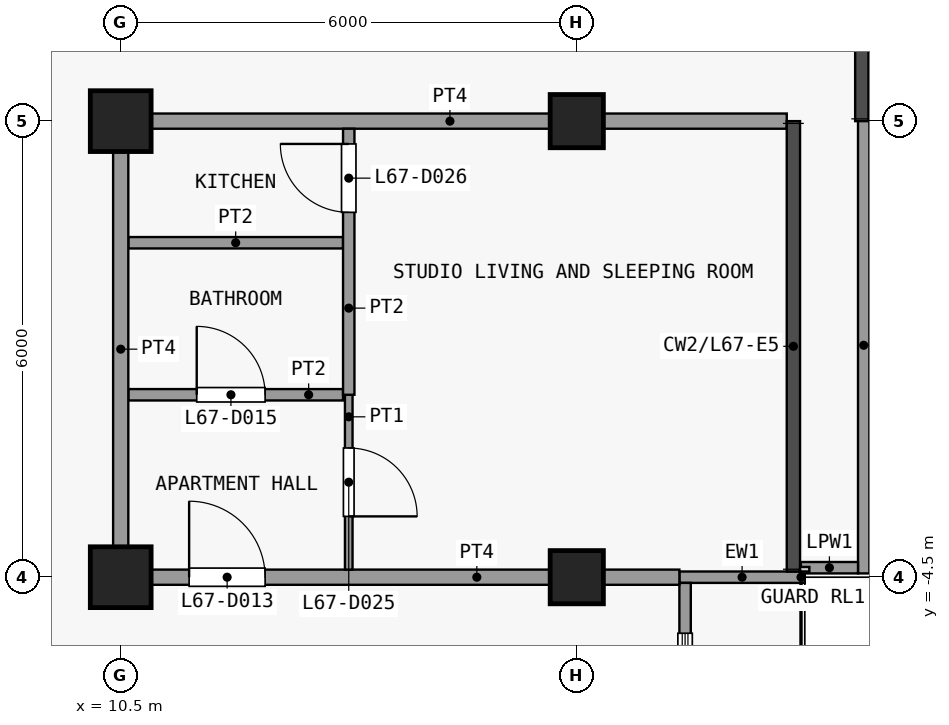
"""IFC4 building model, lengths in metres.
Left out: names, types, materials, properties, quantities, classifications, styles, units other than length and angle.
Written with IfcOpenShell. Run it as: python <this file> out.ifc"""

import sys

from ifc_helpers import new_model, si_unit, direction, frame, frame_2d, origin, origin_2d, place, context, subcontext, project, spatial, rectangle, extrude, element, fill, save


model = new_model("IFC4")
c1 = context("Model", 3, precision=1e-05, world=origin(), true_north=direction((0.0, 1.0)))
c2 = subcontext(c1, "Body", "Model", "MODEL_VIEW")
j1 = project(units=[si_unit("LENGTHUNIT", "METRE"), si_unit("PLANEANGLEUNIT", "RADIAN")], contexts=[c1])
p1 = place(None, origin())
s1 = spatial("IfcSite", under=j1, at=p1, CompositionType="ELEMENT")
p2 = place(p1, origin())
s2 = spatial("IfcBuilding", under=s1, at=p2, CompositionType="ELEMENT")
p3 = place(p2, frame((0.0, 0.0, 266.3)))
s3 = spatial("IfcBuildingStorey", under=s2, at=p3, CompositionType="ELEMENT", Elevation=266.3)
for number, where, z_axis, x_axis in (
    (1, (10.5, -4.5, 0.0), (0.0, 0.0, 1.0), (1.0, 0.0, 0.0)),
    (2, (10.5, 1.5, 0.0), (0.0, 0.0, 1.0), (1.0, 0.0, 0.0)),
):
    element("IfcColumn", number, at=place(p3, frame(where, z_axis=z_axis, x_axis=x_axis)), inside=s3, PredefinedType="COLUMN", context=c2, shape_type="SweptSolid", body=[
        extrude(rectangle(XDim=0.8, YDim=0.8, at=origin_2d()), origin(), (0.0, 0.0, 1.0), 3.6),
    ])
for number, where, z_axis, x_axis in (
    (3, (16.5, -4.5, 0.0), (0.0, 0.0, 1.0), (1.0, 0.0, 0.0)),
    (4, (16.5, 1.5, 0.0), (0.0, 0.0, 1.0), (1.0, 0.0, 0.0)),
):
    element("IfcColumn", number, at=place(p3, frame(where, z_axis=z_axis, x_axis=x_axis)), inside=s3, PredefinedType="COLUMN", context=c2, shape_type="SweptSolid", body=[
        extrude(rectangle(XDim=0.7, YDim=0.7, at=origin_2d()), origin(), (0.0, 0.0, 1.0), 3.6),
    ])
p4 = place(p3, frame((17.85, -4.5, 0.0), z_axis=(0.0, 0.0, 1.0), x_axis=(1.0, 0.0, 0.0)))
e5 = element("IfcWall", 5, at=p4, inside=s3, PredefinedType="SOLIDWALL", context=c2, shape_type="SweptSolid", body=[
    extrude(rectangle(XDim=1.65, YDim=0.15, at=frame_2d((0.825, 0.0))), origin(), (0.0, 0.0, 1.0), 3.3),
])
p5 = place(p3, frame((17.925, -4.575, 0.0), z_axis=(0.0, 0.0, 1.0), x_axis=(0.0, -1.0, 0.0)))
e6 = element("IfcWall", 6, at=p5, inside=s3, PredefinedType="SOLIDWALL", context=c2, shape_type="SweptSolid", body=[
    extrude(rectangle(XDim=8.85, YDim=0.15, at=frame_2d((4.425, 0.0))), origin(), (0.0, 0.0, 1.0), 3.3),
])
p6 = place(p5, frame((4.325, 0.0, 0.0)))
e7 = element("IfcOpeningElement", 7, at=p6, cuts=e6, PredefinedType="OPENING", context=c2, shape_type="SweptSolid", body=[
    extrude(rectangle(XDim=1.2, YDim=2.4, at=frame_2d((0.6, 1.2))), frame((0.0, 0.085, 0.0), z_axis=(0.0, -1.0, 0.0), x_axis=(1.0, 0.0, 0.0)), (0.0, 0.0, 1.0), 0.17),
])
p7 = place(p5, frame((6.65, 0.0, 0.9)))
e8 = element("IfcOpeningElement", 8, at=p7, cuts=e6, PredefinedType="OPENING", context=c2, shape_type="SweptSolid", body=[
    extrude(rectangle(XDim=1.95, YDim=2.1, at=frame_2d((0.975, 1.05))), frame((0.0, 0.085, 0.0), z_axis=(0.0, -1.0, 0.0), x_axis=(1.0, 0.0, 0.0)), (0.0, 0.0, 1.0), 0.17),
])
p8 = place(p5, frame((0.662, 0.0, 0.9)))
e9 = element("IfcOpeningElement", 9, at=p8, cuts=e6, PredefinedType="OPENING", context=c2, shape_type="SweptSolid", body=[
    extrude(rectangle(XDim=2.513, YDim=2.1, at=frame_2d((1.256, 1.05))), frame((0.0, 0.085, 0.0), z_axis=(0.0, -1.0, 0.0), x_axis=(1.0, 0.0, 0.0)), (0.0, 0.0, 1.0), 0.17),
])
p9 = place(p3, frame((20.275, 1.552, 0.0), z_axis=(0.0, 0.0, 1.0), x_axis=(0.0, -1.0, 0.0)))
e10 = element("IfcWall", 10, at=p9, inside=s3, PredefinedType="PARAPET", context=c2, shape_type="SweptSolid", body=[
    extrude(rectangle(XDim=6.002, YDim=0.15, at=frame_2d((3.001, 0.0))), origin(), (0.0, 0.0, 1.0), 1.15),
])
p10 = place(p3, frame((20.2, -4.375, 0.0), z_axis=(0.0, 0.0, 1.0), x_axis=(-1.0, 0.0, 0.0)))
e11 = element("IfcWall", 11, at=p10, inside=s3, PredefinedType="PARAPET", context=c2, shape_type="SweptSolid", body=[
    extrude(rectangle(XDim=0.752, YDim=0.15, at=frame_2d((0.376, 0.0))), origin(), (0.0, 0.0, 1.0), 1.15),
])
p11 = place(p3, frame((10.4, -4.5, 0.0), z_axis=(0.0, 0.0, 1.0), x_axis=(1.0, 0.0, 0.0)))
e12 = element("IfcWall", 12, at=p11, inside=s3, PredefinedType="PARTITIONING", context=c2, shape_type="SweptSolid", body=[
    extrude(rectangle(XDim=7.45, YDim=0.2, at=frame_2d((3.725, 0.0))), origin(), (0.0, 0.0, 1.0), 3.3),
])
p12 = place(p11, frame((1.0, 0.0, 0.0)))
e13 = element("IfcOpeningElement", 13, at=p12, cuts=e12, PredefinedType="OPENING", context=c2, shape_type="SweptSolid", body=[
    extrude(rectangle(XDim=1.0, YDim=2.1, at=frame_2d((0.5, 1.05))), frame((0.0, 0.11, 0.0), z_axis=(0.0, -1.0, 0.0), x_axis=(1.0, 0.0, 0.0)), (0.0, 0.0, 1.0), 0.22),
])
p13 = place(p3, frame((10.6, -2.1, 0.0), z_axis=(0.0, 0.0, 1.0), x_axis=(1.0, 0.0, 0.0)))
e14 = element("IfcWall", 14, at=p13, inside=s3, PredefinedType="PARTITIONING", context=c2, shape_type="SweptSolid", body=[
    extrude(rectangle(XDim=2.825, YDim=0.15, at=frame_2d((1.413, 0.0))), origin(), (0.0, 0.0, 1.0), 3.3),
])
p14 = place(p13, frame((0.9, 0.0, 0.0)))
e15 = element("IfcOpeningElement", 15, at=p14, cuts=e14, PredefinedType="OPENING", context=c2, shape_type="SweptSolid", body=[
    extrude(rectangle(XDim=0.9, YDim=2.1, at=frame_2d((0.45, 1.05))), frame((0.0, 0.085, 0.0), z_axis=(0.0, -1.0, 0.0), x_axis=(1.0, 0.0, 0.0)), (0.0, 0.0, 1.0), 0.17),
])
p15 = place(p3, frame((10.6, -0.1, 0.0), z_axis=(0.0, 0.0, 1.0), x_axis=(1.0, 0.0, 0.0)))
e16 = element("IfcWall", 16, at=p15, inside=s3, PredefinedType="PARTITIONING", context=c2, shape_type="SweptSolid", body=[
    extrude(rectangle(XDim=2.825, YDim=0.15, at=frame_2d((1.413, 0.0))), origin(), (0.0, 0.0, 1.0), 3.3),
])
p16 = place(p3, frame((10.4, 1.5, 0.0), z_axis=(0.0, 0.0, 1.0), x_axis=(1.0, 0.0, 0.0)))
e17 = element("IfcWall", 17, at=p16, inside=s3, PredefinedType="PARTITIONING", context=c2, shape_type="SweptSolid", body=[
    extrude(rectangle(XDim=8.863, YDim=0.2, at=frame_2d((4.431, 0.0))), origin(), (0.0, 0.0, 1.0), 3.3),
])
p17 = place(p3, frame((10.5, -4.4, 0.0), z_axis=(0.0, 0.0, 1.0), x_axis=(0.0, 1.0, 0.0)))
e18 = element("IfcWall", 18, at=p17, inside=s3, PredefinedType="PARTITIONING", context=c2, shape_type="SweptSolid", body=[
    extrude(rectangle(XDim=5.8, YDim=0.2, at=frame_2d((2.9, 0.0))), origin(), (0.0, 0.0, 1.0), 3.3),
])
p18 = place(p3, frame((13.5, -4.4, 0.0), z_axis=(0.0, 0.0, 1.0), x_axis=(0.0, 1.0, 0.0)))
e19 = element("IfcWall", 19, at=p18, inside=s3, PredefinedType="PARTITIONING", context=c2, shape_type="SweptSolid", body=[
    extrude(rectangle(XDim=2.3, YDim=0.1, at=frame_2d((1.15, 0.0))), origin(), (0.0, 0.0, 1.0), 3.3),
])
p19 = place(p18, frame((0.7, 0.0, 0.0)))
e20 = element("IfcOpeningElement", 20, at=p19, cuts=e19, PredefinedType="OPENING", context=c2, shape_type="SweptSolid", body=[
    extrude(rectangle(XDim=0.9, YDim=2.1, at=frame_2d((0.45, 1.05))), frame((0.0, 0.06, 0.0), z_axis=(0.0, -1.0, 0.0), x_axis=(1.0, 0.0, 0.0)), (0.0, 0.0, 1.0), 0.12),
])
p20 = place(p3, frame((13.5, -2.1, 0.0), z_axis=(0.0, 0.0, 1.0), x_axis=(0.0, 1.0, 0.0)))
e21 = element("IfcWall", 21, at=p20, inside=s3, PredefinedType="PARTITIONING", context=c2, shape_type="SweptSolid", body=[
    extrude(rectangle(XDim=3.5, YDim=0.15, at=frame_2d((1.75, 0.0))), origin(), (0.0, 0.0, 1.0), 3.3),
])
p21 = place(p20, frame((2.4, 0.0, 0.0)))
e22 = element("IfcOpeningElement", 22, at=p21, cuts=e21, PredefinedType="OPENING", context=c2, shape_type="SweptSolid", body=[
    extrude(rectangle(XDim=0.9, YDim=2.1, at=frame_2d((0.45, 1.05))), frame((0.0, 0.085, 0.0), z_axis=(0.0, -1.0, 0.0), x_axis=(1.0, 0.0, 0.0)), (0.0, 0.0, 1.0), 0.17),
])
p22 = place(p8, origin())
e23 = element("IfcWindow", 23, at=p22, inside=s3, PartitioningType="SINGLE_PANEL", PredefinedType="WINDOW", context=c2, shape_type="SweptSolid", body=[
    extrude(rectangle(XDim=2.513, YDim=2.1, at=frame_2d((1.256, 1.05))), frame((0.0, 0.03, 0.0), z_axis=(0.0, -1.0, 0.0), x_axis=(1.0, 0.0, 0.0)), (0.0, 0.0, 1.0), 0.06),
])
fill(e9, e23)
p23 = place(p12, origin())
e24 = element("IfcDoor", 24, at=p23, inside=s3, OperationType="SINGLE_SWING_RIGHT", PredefinedType="DOOR", context=c2, shape_type="SweptSolid", body=[
    extrude(rectangle(XDim=1.0, YDim=2.1, at=frame_2d((0.5, 1.05))), frame((0.0, 0.025, 0.0), z_axis=(0.0, -1.0, 0.0), x_axis=(1.0, 0.0, 0.0)), (0.0, 0.0, 1.0), 0.05),
])
fill(e13, e24)
p24 = place(p14, origin())
e25 = element("IfcDoor", 25, at=p24, inside=s3, OperationType="SINGLE_SWING_RIGHT", PredefinedType="DOOR", context=c2, shape_type="SweptSolid", body=[
    extrude(rectangle(XDim=0.9, YDim=2.1, at=frame_2d((0.45, 1.05))), frame((0.0, 0.025, 0.0), z_axis=(0.0, -1.0, 0.0), x_axis=(1.0, 0.0, 0.0)), (0.0, 0.0, 1.0), 0.05),
])
fill(e15, e25)
p25 = place(p19, origin())
e26 = element("IfcDoor", 26, at=p25, inside=s3, OperationType="SINGLE_SWING_LEFT", PredefinedType="DOOR", context=c2, shape_type="SweptSolid", body=[
    extrude(rectangle(XDim=0.9, YDim=2.1, at=frame_2d((0.45, 1.05))), frame((0.0, 0.025, 0.0), z_axis=(0.0, -1.0, 0.0), x_axis=(1.0, 0.0, 0.0)), (0.0, 0.0, 1.0), 0.05),
])
fill(e20, e26)
p26 = place(p21, origin())
e27 = element("IfcDoor", 27, at=p26, inside=s3, OperationType="SINGLE_SWING_LEFT", PredefinedType="DOOR", context=c2, shape_type="SweptSolid", body=[
    extrude(rectangle(XDim=0.9, YDim=2.1, at=frame_2d((0.45, 1.05))), frame((0.0, 0.025, 0.0), z_axis=(0.0, -1.0, 0.0), x_axis=(1.0, 0.0, 0.0)), (0.0, 0.0, 1.0), 0.05),
])
fill(e22, e27)
save(model, sys.argv[1])
